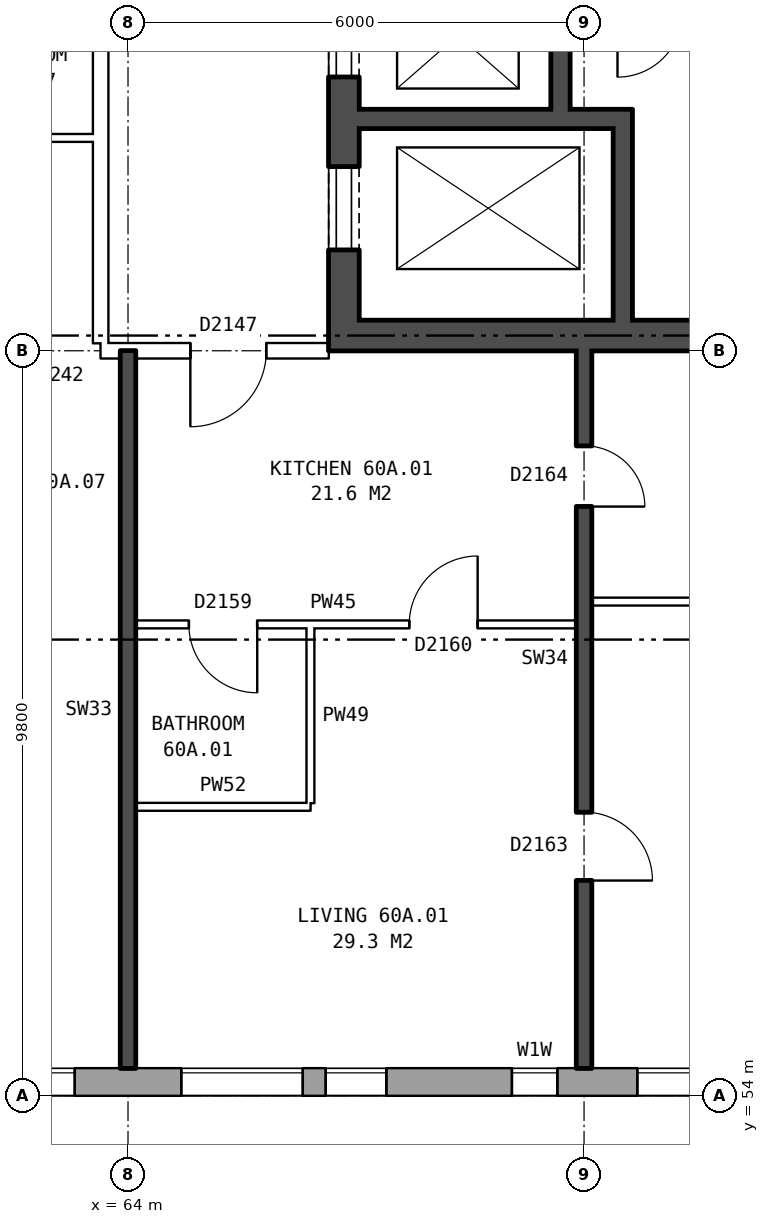
"""IFC4 building model, lengths in metres.
Left out: names, types, materials, properties, quantities, classifications, styles, units other than length and angle.
Written with IfcOpenShell. Run it as: python <this file> out.ifc"""

import sys

from ifc_helpers import new_model, si_unit, direction, frame, frame_2d, origin, place, context, subcontext, project, spatial, rectangle, extrude, element, fill, save


model = new_model("IFC4")
c1 = context("Model", 3, precision=1e-05, world=origin(), true_north=direction((0.0, 1.0)))
c2 = subcontext(c1, "Body", "Model", "MODEL_VIEW")
j1 = project(units=[si_unit("LENGTHUNIT", "METRE"), si_unit("PLANEANGLEUNIT", "RADIAN")], contexts=[c1])
p1 = place(None, origin())
s1 = spatial("IfcSite", under=j1, at=p1, CompositionType="ELEMENT")
p2 = place(p1, origin())
s2 = spatial("IfcBuilding", under=s1, at=p2, CompositionType="ELEMENT")
p3 = place(p2, frame((0.0, 0.0, 212.1)))
s3 = spatial("IfcBuildingStorey", under=s2, at=p3, CompositionType="ELEMENT", Elevation=212.1)
p4 = place(p3, frame((35.075, 54.18, 0.0), z_axis=(0.0, 0.0, 1.0), x_axis=(1.0, 0.0, 0.0)))
e1 = element("IfcWall", 1, at=p4, inside=s3, PredefinedType="STANDARD", context=c2, shape_type="SweptSolid", body=[
    extrude(rectangle(XDim=39.875, YDim=0.36, at=frame_2d((19.938, 0.0))), origin(), (0.0, 0.0, 1.0), 2.85),
])
p5 = place(p4, frame((0.3, 0.0, 0.8)))
e2 = element("IfcOpeningElement", 2, at=p5, cuts=e1, PredefinedType="OPENING", context=c2, shape_type="SweptSolid", body=[
    extrude(rectangle(XDim=0.8, YDim=1.5, at=frame_2d((0.4, 0.75))), frame((0.0, 0.19, 0.0), z_axis=(0.0, -1.0, 0.0), x_axis=(1.0, 0.0, 0.0)), (0.0, 0.0, 1.0), 0.38),
])
p6 = place(p4, frame((5.625, 0.0, 0.8)))
e3 = element("IfcOpeningElement", 3, at=p6, cuts=e1, PredefinedType="OPENING", context=c2, shape_type="SweptSolid", body=[
    extrude(rectangle(XDim=1.6, YDim=1.8, at=frame_2d((0.8, 0.9))), frame((0.0, 0.19, 0.0), z_axis=(0.0, -1.0, 0.0), x_axis=(1.0, 0.0, 0.0)), (0.0, 0.0, 1.0), 0.38),
])
p7 = place(p4, frame((8.625, 0.0, 0.8)))
e4 = element("IfcOpeningElement", 4, at=p7, cuts=e1, PredefinedType="OPENING", context=c2, shape_type="SweptSolid", body=[
    extrude(rectangle(XDim=1.6, YDim=1.8, at=frame_2d((0.8, 0.9))), frame((0.0, 0.19, 0.0), z_axis=(0.0, -1.0, 0.0), x_axis=(1.0, 0.0, 0.0)), (0.0, 0.0, 1.0), 0.38),
])
p8 = place(p4, frame((11.625, 0.0, 0.8)))
e5 = element("IfcOpeningElement", 5, at=p8, cuts=e1, PredefinedType="OPENING", context=c2, shape_type="SweptSolid", body=[
    extrude(rectangle(XDim=1.6, YDim=1.8, at=frame_2d((0.8, 0.9))), frame((0.0, 0.19, 0.0), z_axis=(0.0, -1.0, 0.0), x_axis=(1.0, 0.0, 0.0)), (0.0, 0.0, 1.0), 0.38),
])
p9 = place(p4, frame((14.625, 0.0, 0.8)))
e6 = element("IfcOpeningElement", 6, at=p9, cuts=e1, PredefinedType="OPENING", context=c2, shape_type="SweptSolid", body=[
    extrude(rectangle(XDim=1.6, YDim=1.8, at=frame_2d((0.8, 0.9))), frame((0.0, 0.19, 0.0), z_axis=(0.0, -1.0, 0.0), x_axis=(1.0, 0.0, 0.0)), (0.0, 0.0, 1.0), 0.38),
])
p10 = place(p4, frame((17.625, 0.0, 0.8)))
e7 = element("IfcOpeningElement", 7, at=p10, cuts=e1, PredefinedType="OPENING", context=c2, shape_type="SweptSolid", body=[
    extrude(rectangle(XDim=1.6, YDim=1.8, at=frame_2d((0.8, 0.9))), frame((0.0, 0.19, 0.0), z_axis=(0.0, -1.0, 0.0), x_axis=(1.0, 0.0, 0.0)), (0.0, 0.0, 1.0), 0.38),
])
p11 = place(p4, frame((20.625, 0.0, 0.8)))
e8 = element("IfcOpeningElement", 8, at=p11, cuts=e1, PredefinedType="OPENING", context=c2, shape_type="SweptSolid", body=[
    extrude(rectangle(XDim=1.6, YDim=1.8, at=frame_2d((0.8, 0.9))), frame((0.0, 0.19, 0.0), z_axis=(0.0, -1.0, 0.0), x_axis=(1.0, 0.0, 0.0)), (0.0, 0.0, 1.0), 0.38),
])
p12 = place(p4, frame((23.625, 0.0, 0.8)))
e9 = element("IfcOpeningElement", 9, at=p12, cuts=e1, PredefinedType="OPENING", context=c2, shape_type="SweptSolid", body=[
    extrude(rectangle(XDim=1.6, YDim=1.8, at=frame_2d((0.8, 0.9))), frame((0.0, 0.19, 0.0), z_axis=(0.0, -1.0, 0.0), x_axis=(1.0, 0.0, 0.0)), (0.0, 0.0, 1.0), 0.38),
])
p13 = place(p4, frame((26.625, 0.0, 0.8)))
e10 = element("IfcOpeningElement", 10, at=p13, cuts=e1, PredefinedType="OPENING", context=c2, shape_type="SweptSolid", body=[
    extrude(rectangle(XDim=1.6, YDim=1.8, at=frame_2d((0.8, 0.9))), frame((0.0, 0.19, 0.0), z_axis=(0.0, -1.0, 0.0), x_axis=(1.0, 0.0, 0.0)), (0.0, 0.0, 1.0), 0.38),
])
p14 = place(p4, frame((29.625, 0.0, 0.8)))
e11 = element("IfcOpeningElement", 11, at=p14, cuts=e1, PredefinedType="OPENING", context=c2, shape_type="SweptSolid", body=[
    extrude(rectangle(XDim=1.6, YDim=1.8, at=frame_2d((0.8, 0.9))), frame((0.0, 0.19, 0.0), z_axis=(0.0, -1.0, 0.0), x_axis=(1.0, 0.0, 0.0)), (0.0, 0.0, 1.0), 0.38),
])
p15 = place(p4, frame((31.525, 0.0, 0.8)))
e12 = element("IfcOpeningElement", 12, at=p15, cuts=e1, PredefinedType="OPENING", context=c2, shape_type="SweptSolid", body=[
    extrude(rectangle(XDim=0.8, YDim=1.5, at=frame_2d((0.4, 0.75))), frame((0.0, 0.19, 0.0), z_axis=(0.0, -1.0, 0.0), x_axis=(1.0, 0.0, 0.0)), (0.0, 0.0, 1.0), 0.38),
])
p16 = place(p4, frame((35.625, 0.0, 0.8)))
e13 = element("IfcOpeningElement", 13, at=p16, cuts=e1, PredefinedType="OPENING", context=c2, shape_type="SweptSolid", body=[
    extrude(rectangle(XDim=1.6, YDim=1.8, at=frame_2d((0.8, 0.9))), frame((0.0, 0.19, 0.0), z_axis=(0.0, -1.0, 0.0), x_axis=(1.0, 0.0, 0.0)), (0.0, 0.0, 1.0), 0.38),
])
p17 = place(p4, frame((1.4, 0.0, 0.8)))
e14 = element("IfcOpeningElement", 14, at=p17, cuts=e1, PredefinedType="OPENING", context=c2, shape_type="SweptSolid", body=[
    extrude(rectangle(XDim=1.4, YDim=1.8, at=frame_2d((0.7, 0.9))), frame((0.0, 0.19, 0.0), z_axis=(0.0, -1.0, 0.0), x_axis=(1.0, 0.0, 0.0)), (0.0, 0.0, 1.0), 0.38),
])
p18 = place(p4, frame((33.975, 0.0, 1.7)))
e15 = element("IfcOpeningElement", 15, at=p18, cuts=e1, PredefinedType="OPENING", context=c2, shape_type="SweptSolid", body=[
    extrude(rectangle(XDim=0.6, YDim=0.9, at=frame_2d((0.3, 0.45))), frame((0.0, 0.19, 0.0), z_axis=(0.0, -1.0, 0.0), x_axis=(1.0, 0.0, 0.0)), (0.0, 0.0, 1.0), 0.38),
])
p19 = place(p3, frame((66.84, 63.8, 0.0), z_axis=(0.0, 0.0, 1.0), x_axis=(0.0, 1.0, 0.0)))
e16 = element("IfcWall", 16, at=p19, inside=s3, PredefinedType="SHEAR", context=c2, shape_type="SweptSolid", body=[
    extrude(rectangle(XDim=12.4, YDim=0.4, at=frame_2d((6.2, 0.0))), origin(), (0.0, 0.0, 1.0), 2.85),
])
p20 = place(p19, frame((1.325, 0.0, 0.0)))
e17 = element("IfcOpeningElement", 17, at=p20, cuts=e16, PredefinedType="OPENING", context=c2, shape_type="SweptSolid", body=[
    extrude(rectangle(XDim=1.1, YDim=2.1, at=frame_2d((0.55, 1.05))), frame((0.0, 0.21, 0.0), z_axis=(0.0, -1.0, 0.0), x_axis=(1.0, 0.0, 0.0)), (0.0, 0.0, 1.0), 0.42),
])
p21 = place(p19, frame((3.6, 0.0, 0.0)))
e18 = element("IfcOpeningElement", 18, at=p21, cuts=e16, PredefinedType="OPENING", context=c2, shape_type="SweptSolid", body=[
    extrude(rectangle(XDim=1.1, YDim=2.1, at=frame_2d((0.55, 1.05))), frame((0.0, 0.21, 0.0), z_axis=(0.0, -1.0, 0.0), x_axis=(1.0, 0.0, 0.0)), (0.0, 0.0, 1.0), 0.42),
])
p22 = place(p19, frame((5.8, 0.0, 0.0)))
e19 = element("IfcOpeningElement", 19, at=p22, cuts=e16, PredefinedType="OPENING", context=c2, shape_type="SweptSolid", body=[
    extrude(rectangle(XDim=1.1, YDim=2.1, at=frame_2d((0.55, 1.05))), frame((0.0, 0.21, 0.0), z_axis=(0.0, -1.0, 0.0), x_axis=(1.0, 0.0, 0.0)), (0.0, 0.0, 1.0), 0.42),
])
p23 = place(p19, frame((8.0, 0.0, 0.0)))
e20 = element("IfcOpeningElement", 20, at=p23, cuts=e16, PredefinedType="OPENING", context=c2, shape_type="SweptSolid", body=[
    extrude(rectangle(XDim=1.1, YDim=2.1, at=frame_2d((0.55, 1.05))), frame((0.0, 0.21, 0.0), z_axis=(0.0, -1.0, 0.0), x_axis=(1.0, 0.0, 0.0)), (0.0, 0.0, 1.0), 0.42),
])
p24 = place(p19, frame((9.9, 0.0, 0.0)))
e21 = element("IfcOpeningElement", 21, at=p24, cuts=e16, PredefinedType="OPENING", context=c2, shape_type="SweptSolid", body=[
    extrude(rectangle(XDim=1.1, YDim=2.1, at=frame_2d((0.55, 1.05))), frame((0.0, 0.21, 0.0), z_axis=(0.0, -1.0, 0.0), x_axis=(1.0, 0.0, 0.0)), (0.0, 0.0, 1.0), 0.42),
])
p25 = place(p3, frame((67.04, 64.0, 0.0), z_axis=(0.0, 0.0, 1.0), x_axis=(1.0, 0.0, 0.0)))
e22 = element("IfcWall", 22, at=p25, inside=s3, PredefinedType="SHEAR", context=c2, shape_type="SweptSolid", body=[
    extrude(rectangle(XDim=8.2, YDim=0.4, at=frame_2d((4.1, 0.0))), origin(), (0.0, 0.0, 1.0), 2.85),
])
p26 = place(p3, frame((67.04, 66.85, 0.0), z_axis=(0.0, 0.0, 1.0), x_axis=(1.0, 0.0, 0.0)))
e23 = element("IfcWall", 23, at=p26, inside=s3, PredefinedType="SHEAR", context=c2, shape_type="SweptSolid", body=[
    extrude(rectangle(XDim=3.595, YDim=0.25, at=frame_2d((1.797, 0.0))), origin(), (0.0, 0.0, 1.0), 2.85),
])
p27 = place(p3, frame((69.69, 66.975, 0.0), z_axis=(0.0, 0.0, 1.0), x_axis=(0.0, 1.0, 0.0)))
e24 = element("IfcWall", 24, at=p27, inside=s3, PredefinedType="SHEAR", context=c2, shape_type="SweptSolid", body=[
    extrude(rectangle(XDim=6.6, YDim=0.25, at=frame_2d((3.3, 0.0))), origin(), (0.0, 0.0, 1.0), 2.85),
])
p28 = place(p3, frame((70.51, 64.2, 0.0), z_axis=(0.0, 0.0, 1.0), x_axis=(0.0, 1.0, 0.0)))
e25 = element("IfcWall", 25, at=p28, inside=s3, PredefinedType="SHEAR", context=c2, shape_type="SweptSolid", body=[
    extrude(rectangle(XDim=2.525, YDim=0.25, at=frame_2d((1.263, 0.0))), origin(), (0.0, 0.0, 1.0), 2.85),
])
p29 = place(p3, frame((63.64, 63.9, 0.0), z_axis=(0.0, 0.0, 1.0), x_axis=(0.0, 1.0, 0.0)))
e26 = element("IfcWall", 26, at=p29, inside=s3, PredefinedType="PARTITIONING", context=c2, shape_type="SweptSolid", body=[
    extrude(rectangle(XDim=12.2, YDim=0.2, at=frame_2d((6.1, 0.0))), origin(), (0.0, 0.0, 1.0), 2.85),
])
p30 = place(p29, frame((5.1, 0.0, 0.0)))
e27 = element("IfcOpeningElement", 27, at=p30, cuts=e26, PredefinedType="OPENING", context=c2, shape_type="SweptSolid", body=[
    extrude(rectangle(XDim=2.0, YDim=2.1, at=frame_2d((1.0, 1.05))), frame((0.0, 0.11, 0.0), z_axis=(0.0, -1.0, 0.0), x_axis=(1.0, 0.0, 0.0)), (0.0, 0.0, 1.0), 0.22),
])
p31 = place(p3, frame((64.1, 57.8, 0.0), z_axis=(0.0, 0.0, 1.0), x_axis=(1.0, 0.0, 0.0)))
e28 = element("IfcWall", 28, at=p31, inside=s3, PredefinedType="PARTITIONING", context=c2, shape_type="SweptSolid", body=[
    extrude(rectangle(XDim=2.3, YDim=0.1, at=frame_2d((1.15, 0.0))), origin(), (0.0, 0.0, 1.0), 2.85),
])
p32 = place(p3, frame((64.1, 60.2, 0.0), z_axis=(0.0, 0.0, 1.0), x_axis=(1.0, 0.0, 0.0)))
e29 = element("IfcWall", 29, at=p32, inside=s3, PredefinedType="PARTITIONING", context=c2, shape_type="SweptSolid", body=[
    extrude(rectangle(XDim=5.8, YDim=0.1, at=frame_2d((2.9, 0.0))), origin(), (0.0, 0.0, 1.0), 2.85),
])
p33 = place(p32, frame((3.6, 0.0, 0.0)))
e30 = element("IfcOpeningElement", 30, at=p33, cuts=e29, PredefinedType="OPENING", context=c2, shape_type="SweptSolid", body=[
    extrude(rectangle(XDim=0.9, YDim=2.1, at=frame_2d((0.45, 1.05))), frame((0.0, 0.06, 0.0), z_axis=(0.0, -1.0, 0.0), x_axis=(1.0, 0.0, 0.0)), (0.0, 0.0, 1.0), 0.12),
])
p34 = place(p32, frame((0.7, 0.0, 0.0)))
e31 = element("IfcOpeningElement", 31, at=p34, cuts=e29, PredefinedType="OPENING", context=c2, shape_type="SweptSolid", body=[
    extrude(rectangle(XDim=0.9, YDim=2.1, at=frame_2d((0.45, 1.05))), frame((0.0, 0.06, 0.0), z_axis=(0.0, -1.0, 0.0), x_axis=(1.0, 0.0, 0.0)), (0.0, 0.0, 1.0), 0.12),
])
p35 = place(p3, frame((70.1, 60.5, 0.0), z_axis=(0.0, 0.0, 1.0), x_axis=(1.0, 0.0, 0.0)))
e32 = element("IfcWall", 32, at=p35, inside=s3, PredefinedType="PARTITIONING", context=c2, shape_type="SweptSolid", body=[
    extrude(rectangle(XDim=5.8, YDim=0.1, at=frame_2d((2.9, 0.0))), origin(), (0.0, 0.0, 1.0), 2.85),
])
p36 = place(p3, frame((63.64, 63.8, 0.0), z_axis=(0.0, 0.0, 1.0), x_axis=(1.0, 0.0, 0.0)))
e33 = element("IfcWall", 33, at=p36, inside=s3, PredefinedType="PARTITIONING", context=c2, shape_type="SweptSolid", body=[
    extrude(rectangle(XDim=3.0, YDim=0.2, at=frame_2d((1.5, 0.0))), origin(), (0.0, 0.0, 1.0), 2.85),
])
p37 = place(p36, frame((1.18, 0.0, 0.0)))
e34 = element("IfcOpeningElement", 34, at=p37, cuts=e33, PredefinedType="OPENING", context=c2, shape_type="SweptSolid", body=[
    extrude(rectangle(XDim=1.0, YDim=2.1, at=frame_2d((0.5, 1.05))), frame((0.0, 0.11, 0.0), z_axis=(0.0, -1.0, 0.0), x_axis=(1.0, 0.0, 0.0)), (0.0, 0.0, 1.0), 0.22),
])
p38 = place(p3, frame((61.0, 66.6, 0.0), z_axis=(0.0, 0.0, 1.0), x_axis=(1.0, 0.0, 0.0)))
e35 = element("IfcWall", 35, at=p38, inside=s3, PredefinedType="PARTITIONING", context=c2, shape_type="SweptSolid", body=[
    extrude(rectangle(XDim=2.64, YDim=0.1, at=frame_2d((1.32, 0.0))), origin(), (0.0, 0.0, 1.0), 2.85),
])
p39 = place(p3, frame((64.0, 54.36, 0.0), z_axis=(0.0, 0.0, 1.0), x_axis=(0.0, 1.0, 0.0)))
e36 = element("IfcWall", 36, at=p39, inside=s3, PredefinedType="SOLIDWALL", context=c2, shape_type="SweptSolid", body=[
    extrude(rectangle(XDim=9.44, YDim=0.2, at=frame_2d((4.72, 0.0))), origin(), (0.0, 0.0, 1.0), 2.85),
])
p40 = place(p3, frame((66.4, 57.85, 0.0), z_axis=(0.0, 0.0, 1.0), x_axis=(0.0, 1.0, 0.0)))
e37 = element("IfcWall", 37, at=p40, inside=s3, PredefinedType="PARTITIONING", context=c2, shape_type="SweptSolid", body=[
    extrude(rectangle(XDim=2.3, YDim=0.1, at=frame_2d((1.15, 0.0))), origin(), (0.0, 0.0, 1.0), 2.85),
])
p41 = place(p3, frame((70.0, 54.36, 0.0), z_axis=(0.0, 0.0, 1.0), x_axis=(0.0, 1.0, 0.0)))
e38 = element("IfcWall", 38, at=p41, inside=s3, PredefinedType="SOLIDWALL", context=c2, shape_type="SweptSolid", body=[
    extrude(rectangle(XDim=9.44, YDim=0.2, at=frame_2d((4.72, 0.0))), origin(), (0.0, 0.0, 1.0), 2.85),
])
p42 = place(p41, frame((2.47, 0.0, 0.0)))
e39 = element("IfcOpeningElement", 39, at=p42, cuts=e38, PredefinedType="OPENING", context=c2, shape_type="SweptSolid", body=[
    extrude(rectangle(XDim=0.9, YDim=2.1, at=frame_2d((0.45, 1.05))), frame((0.0, 0.11, 0.0), z_axis=(0.0, -1.0, 0.0), x_axis=(1.0, 0.0, 0.0)), (0.0, 0.0, 1.0), 0.22),
])
p43 = place(p41, frame((7.39, 0.0, 0.0)))
e40 = element("IfcOpeningElement", 40, at=p43, cuts=e38, PredefinedType="OPENING", context=c2, shape_type="SweptSolid", body=[
    extrude(rectangle(XDim=0.8, YDim=2.1, at=frame_2d((0.4, 1.05))), frame((0.0, 0.11, 0.0), z_axis=(0.0, -1.0, 0.0), x_axis=(1.0, 0.0, 0.0)), (0.0, 0.0, 1.0), 0.22),
])
p44 = place(p13, origin())
e41 = element("IfcWindow", 41, at=p44, inside=s3, PartitioningType="SINGLE_PANEL", PredefinedType="WINDOW", context=c2, shape_type="SweptSolid", body=[
    extrude(rectangle(XDim=1.6, YDim=1.8, at=frame_2d((0.8, 0.9))), frame((0.0, 0.15, 0.0), z_axis=(0.0, -1.0, 0.0), x_axis=(1.0, 0.0, 0.0)), (0.0, 0.0, 1.0), 0.06),
])
fill(e10, e41)
p45 = place(p14, origin())
e42 = element("IfcWindow", 42, at=p45, inside=s3, PartitioningType="SINGLE_PANEL", PredefinedType="WINDOW", context=c2, shape_type="SweptSolid", body=[
    extrude(rectangle(XDim=1.6, YDim=1.8, at=frame_2d((0.8, 0.9))), frame((0.0, 0.15, 0.0), z_axis=(0.0, -1.0, 0.0), x_axis=(1.0, 0.0, 0.0)), (0.0, 0.0, 1.0), 0.06),
])
fill(e11, e42)
p46 = place(p15, origin())
e43 = element("IfcWindow", 43, at=p46, inside=s3, PartitioningType="SINGLE_PANEL", PredefinedType="WINDOW", context=c2, shape_type="SweptSolid", body=[
    extrude(rectangle(XDim=0.8, YDim=1.5, at=frame_2d((0.4, 0.75))), frame((0.0, 0.15, 0.0), z_axis=(0.0, -1.0, 0.0), x_axis=(1.0, 0.0, 0.0)), (0.0, 0.0, 1.0), 0.06),
])
fill(e12, e43)
p47 = place(p16, origin())
e44 = element("IfcWindow", 44, at=p47, inside=s3, PartitioningType="SINGLE_PANEL", PredefinedType="WINDOW", context=c2, shape_type="SweptSolid", body=[
    extrude(rectangle(XDim=1.6, YDim=1.8, at=frame_2d((0.8, 0.9))), frame((0.0, 0.15, 0.0), z_axis=(0.0, -1.0, 0.0), x_axis=(1.0, 0.0, 0.0)), (0.0, 0.0, 1.0), 0.06),
])
fill(e13, e44)
p48 = place(p20, origin())
e45 = element("IfcDoor", 45, at=p48, inside=s3, OperationType="DOUBLE_DOOR_SLIDING", PredefinedType="DOOR", context=c2, shape_type="SweptSolid", body=[
    extrude(rectangle(XDim=1.1, YDim=2.1, at=frame_2d((0.55, 1.05))), frame((0.0, -0.135, 0.0), z_axis=(0.0, -1.0, 0.0), x_axis=(1.0, 0.0, 0.0)), (0.0, 0.0, 1.0), 0.05),
])
fill(e17, e45)
p49 = place(p21, origin())
e46 = element("IfcDoor", 46, at=p49, inside=s3, OperationType="DOUBLE_DOOR_SLIDING", PredefinedType="DOOR", context=c2, shape_type="SweptSolid", body=[
    extrude(rectangle(XDim=1.1, YDim=2.1, at=frame_2d((0.55, 1.05))), frame((0.0, -0.135, 0.0), z_axis=(0.0, -1.0, 0.0), x_axis=(1.0, 0.0, 0.0)), (0.0, 0.0, 1.0), 0.05),
])
fill(e18, e46)
p50 = place(p42, frame((0.9, 0.0, 0.0), z_axis=(0.0, 0.0, 1.0), x_axis=(-1.0, 0.0, 0.0)))
e47 = element("IfcDoor", 47, at=p50, inside=s3, OperationType="SINGLE_SWING_RIGHT", PredefinedType="DOOR", context=c2, shape_type="SweptSolid", body=[
    extrude(rectangle(XDim=0.9, YDim=2.1, at=frame_2d((0.45, 1.05))), frame((0.0, 0.025, 0.0), z_axis=(0.0, -1.0, 0.0), x_axis=(1.0, 0.0, 0.0)), (0.0, 0.0, 1.0), 0.05),
])
fill(e39, e47)
p51 = place(p37, frame((1.0, 0.0, 0.0), z_axis=(0.0, 0.0, 1.0), x_axis=(-1.0, 0.0, 0.0)))
e48 = element("IfcDoor", 48, at=p51, inside=s3, OperationType="SINGLE_SWING_RIGHT", PredefinedType="DOOR", context=c2, shape_type="SweptSolid", body=[
    extrude(rectangle(XDim=1.0, YDim=2.1, at=frame_2d((0.5, 1.05))), frame((0.0, 0.025, 0.0), z_axis=(0.0, -1.0, 0.0), x_axis=(1.0, 0.0, 0.0)), (0.0, 0.0, 1.0), 0.05),
])
fill(e34, e48)
p52 = place(p33, origin())
e49 = element("IfcDoor", 49, at=p52, inside=s3, OperationType="SINGLE_SWING_RIGHT", PredefinedType="DOOR", context=c2, shape_type="SweptSolid", body=[
    extrude(rectangle(XDim=0.9, YDim=2.1, at=frame_2d((0.45, 1.05))), frame((0.0, 0.025, 0.0), z_axis=(0.0, -1.0, 0.0), x_axis=(1.0, 0.0, 0.0)), (0.0, 0.0, 1.0), 0.05),
])
fill(e30, e49)
p53 = place(p43, frame((0.8, 0.0, 0.0), z_axis=(0.0, 0.0, 1.0), x_axis=(-1.0, 0.0, 0.0)))
e50 = element("IfcDoor", 50, at=p53, inside=s3, OperationType="SINGLE_SWING_RIGHT", PredefinedType="DOOR", context=c2, shape_type="SweptSolid", body=[
    extrude(rectangle(XDim=0.8, YDim=2.1, at=frame_2d((0.4, 1.05))), frame((0.0, 0.025, 0.0), z_axis=(0.0, -1.0, 0.0), x_axis=(1.0, 0.0, 0.0)), (0.0, 0.0, 1.0), 0.05),
])
fill(e40, e50)
p54 = place(p34, frame((0.9, 0.0, 0.0), z_axis=(0.0, 0.0, 1.0), x_axis=(-1.0, 0.0, 0.0)))
e51 = element("IfcDoor", 51, at=p54, inside=s3, OperationType="SINGLE_SWING_LEFT", PredefinedType="DOOR", context=c2, shape_type="SweptSolid", body=[
    extrude(rectangle(XDim=0.9, YDim=2.1, at=frame_2d((0.45, 1.05))), frame((0.0, 0.025, 0.0), z_axis=(0.0, -1.0, 0.0), x_axis=(1.0, 0.0, 0.0)), (0.0, 0.0, 1.0), 0.05),
])
fill(e31, e51)
p55 = place(p18, origin())
e52 = element("IfcWindow", 52, at=p55, inside=s3, PartitioningType="SINGLE_PANEL", PredefinedType="WINDOW", context=c2, shape_type="SweptSolid", body=[
    extrude(rectangle(XDim=0.6, YDim=0.9, at=frame_2d((0.3, 0.45))), frame((0.0, 0.15, 0.0), z_axis=(0.0, -1.0, 0.0), x_axis=(1.0, 0.0, 0.0)), (0.0, 0.0, 1.0), 0.06),
])
fill(e15, e52)
save(model, sys.argv[1])
